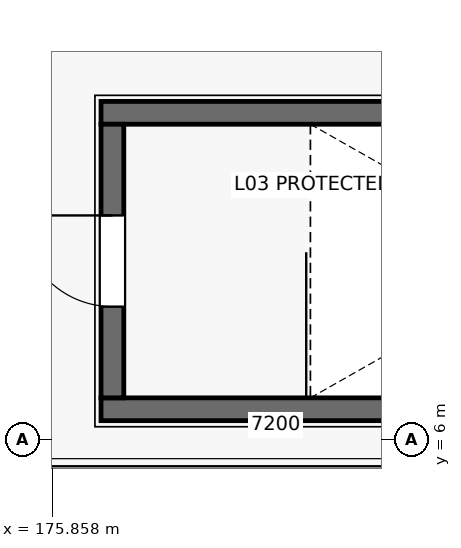
"""IFC4 building model, lengths in metres.
Left out: names, types, materials, properties, quantities, classifications, styles, units other than length and angle.
Written with IfcOpenShell. Run it as: python <this file> out.ifc"""

import sys

from ifc_helpers import new_model, si_unit, direction, frame, frame_2d, origin, place, context, subcontext, project, spatial, rectangle, extrude, element, fill, save


model = new_model("IFC4")
c1 = context("Model", 3, precision=1e-05, world=origin(), true_north=direction((0.0, 1.0)))
c2 = subcontext(c1, "Body", "Model", "MODEL_VIEW")
j1 = project(units=[si_unit("LENGTHUNIT", "METRE"), si_unit("PLANEANGLEUNIT", "RADIAN")], contexts=[c1])
p1 = place(None, origin())
s1 = spatial("IfcSite", under=j1, at=p1, CompositionType="ELEMENT")
p2 = place(p1, origin())
s2 = spatial("IfcBuilding", under=s1, at=p2, CompositionType="ELEMENT")
p3 = place(p2, frame((0.0, 0.0, 13.2)))
s3 = spatial("IfcBuildingStorey", under=s2, at=p3, CompositionType="ELEMENT", Elevation=13.2)
for number, where, z_axis, x_axis in (
    (1, (185.9, 6.4, 0.0), (0.0, 0.0, 1.0), (-1.0, 0.0, 0.0)),
    (2, (176.5, 10.3, 0.0), (0.0, 0.0, 1.0), (1.0, 0.0, 0.0)),
):
    element("IfcWall", number, at=place(p3, frame(where, z_axis=z_axis, x_axis=x_axis)), inside=s3, PredefinedType="SOLIDWALL", context=c2, shape_type="SweptSolid", body=[
        extrude(rectangle(XDim=9.4, YDim=0.3, at=frame_2d((4.7, 0.0))), origin(), (0.0, 0.0, 1.0), 3.4),
    ])
p4 = place(p3, frame((176.65, 6.55, 0.0), z_axis=(0.0, 0.0, 1.0), x_axis=(0.0, 1.0, 0.0)))
e3 = element("IfcWall", 3, at=p4, inside=s3, PredefinedType="SOLIDWALL", context=c2, shape_type="SweptSolid", body=[
    extrude(rectangle(XDim=3.6, YDim=0.3, at=frame_2d((1.8, 0.0))), origin(), (0.0, 0.0, 1.0), 3.4),
])
p5 = place(p4, frame((1.2, 0.0, 0.0)))
e4 = element("IfcOpeningElement", 4, at=p5, cuts=e3, PredefinedType="OPENING", context=c2, shape_type="SweptSolid", body=[
    extrude(rectangle(XDim=1.2, YDim=2.2, at=frame_2d((0.6, 1.1))), frame((0.0, 0.16, 0.0), z_axis=(0.0, -1.0, 0.0), x_axis=(1.0, 0.0, 0.0)), (0.0, 0.0, 1.0), 0.32),
])
p6 = place(p5, origin())
e5 = element("IfcDoor", 5, at=p6, inside=s3, OperationType="SINGLE_SWING_RIGHT", PredefinedType="DOOR", context=c2, shape_type="SweptSolid", body=[
    extrude(rectangle(XDim=1.2, YDim=2.2, at=frame_2d((0.6, 1.1))), frame((0.0, 0.025, 0.0), z_axis=(0.0, -1.0, 0.0), x_axis=(1.0, 0.0, 0.0)), (0.0, 0.0, 1.0), 0.05),
])
fill(e4, e5)
save(model, sys.argv[1])
